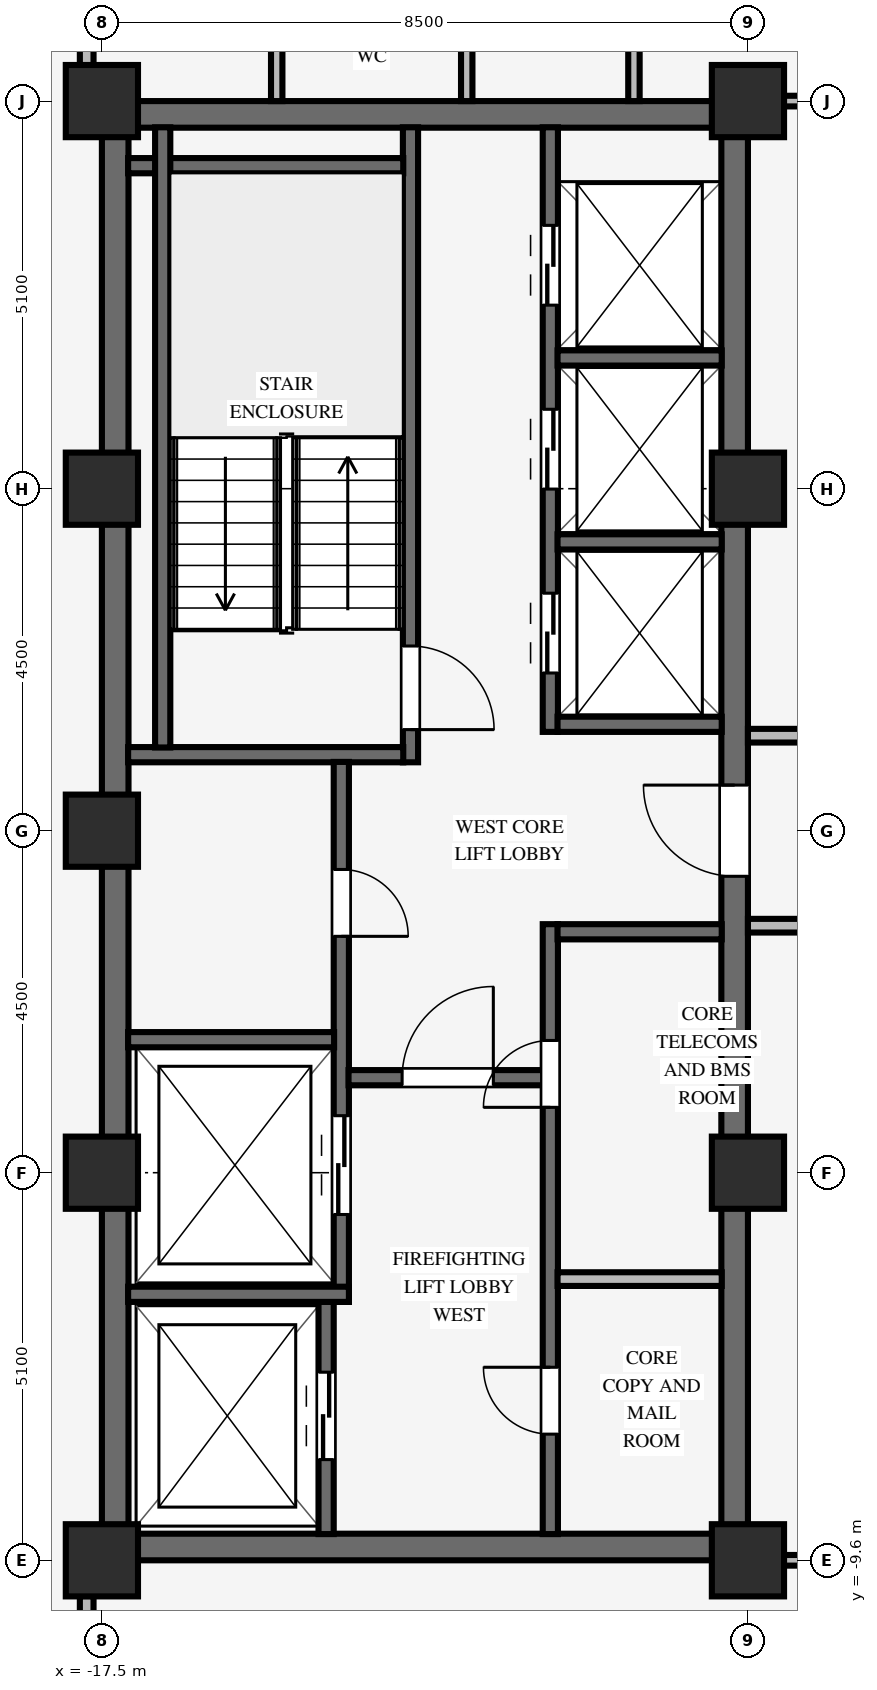
"""IFC4 building model, lengths in metres.
Left out: names, types, materials, properties, quantities, classifications, styles, units other than length and angle.
Written with IfcOpenShell. Run it as: python <this file> out.ifc"""

import sys

from ifc_helpers import new_model, si_unit, direction, frame, frame_2d, origin, origin_2d, place, context, subcontext, project, spatial, rectangle, extrude, source, transform, mapped, element, fill, save


model = new_model("IFC4")
c1 = context("Model", 3, precision=1e-05, world=origin(), true_north=direction((0.0, 1.0)))
c2 = subcontext(c1, "Body", "Model", "MODEL_VIEW")
j1 = project(units=[si_unit("LENGTHUNIT", "METRE"), si_unit("PLANEANGLEUNIT", "RADIAN")], contexts=[c1])
p1 = place(None, origin())
s1 = spatial("IfcSite", under=j1, at=p1, CompositionType="ELEMENT")
p2 = place(p1, origin())
s2 = spatial("IfcBuilding", under=s1, at=p2, CompositionType="ELEMENT")
p3 = place(p2, frame((0.0, 0.0, 223.75)))
s3 = spatial("IfcBuildingStorey", under=s2, at=p3, CompositionType="ELEMENT", Elevation=223.75)
for number, where, z_axis, x_axis in (
    (1, (-17.5, -9.425, 0.0), (0.0, 0.0, 1.0), (1.0, 0.0, 0.0)),
    (2, (-17.5, 9.425, 0.0), (0.0, 0.0, 1.0), (1.0, 0.0, 0.0)),
):
    element("IfcWall", number, at=place(p3, frame(where, z_axis=z_axis, x_axis=x_axis)), inside=s3, PredefinedType="SHEAR", context=c2, shape_type="SweptSolid", body=[
        extrude(rectangle(XDim=8.5, YDim=0.35, at=frame_2d((4.25, 0.0))), origin(), (0.0, 0.0, 1.0), 3.37),
    ])
p4 = place(p3, frame((-17.325, -9.255, 0.0), z_axis=(0.0, 0.0, 1.0), x_axis=(0.0, 1.0, 0.0)))
e3 = element("IfcWall", 3, at=p4, inside=s3, PredefinedType="SHEAR", context=c2, shape_type="SweptSolid", body=[
    extrude(rectangle(XDim=18.51, YDim=0.35, at=frame_2d((9.255, 0.0))), origin(), (0.0, 0.0, 1.0), 3.37),
])
p5 = place(p3, frame((-9.175, -9.255, 0.0), z_axis=(0.0, 0.0, 1.0), x_axis=(0.0, 1.0, 0.0)))
e4 = element("IfcWall", 4, at=p5, inside=s3, PredefinedType="SHEAR", context=c2, shape_type="SweptSolid", body=[
    extrude(rectangle(XDim=18.51, YDim=0.35, at=frame_2d((9.255, 0.0))), origin(), (0.0, 0.0, 1.0), 3.37),
])
p6 = place(p5, frame((8.655, 0.0, 0.0)))
e5 = element("IfcOpeningElement", 5, at=p6, cuts=e4, PredefinedType="OPENING", context=c2, shape_type="SweptSolid", body=[
    extrude(rectangle(XDim=1.2, YDim=2.15, at=frame_2d((0.6, 1.075))), frame((0.0, 0.185, 0.0), z_axis=(0.0, -1.0, 0.0), x_axis=(1.0, 0.0, 0.0)), (0.0, 0.0, 1.0), 0.37),
])
for number, where, z_axis, x_axis in (
    (6, (-17.5, -9.6, 0.0), (0.0, 0.0, 1.0), (1.0, 0.0, 0.0)),
    (7, (-17.5, -4.5, 0.0), (0.0, 0.0, 1.0), (1.0, 0.0, 0.0)),
    (8, (-17.5, 4.5, 0.0), (0.0, 0.0, 1.0), (1.0, 0.0, 0.0)),
    (9, (-17.5, 9.6, 0.0), (0.0, 0.0, 1.0), (1.0, 0.0, 0.0)),
    (10, (-9.0, -9.6, 0.0), (0.0, 0.0, 1.0), (1.0, 0.0, 0.0)),
    (11, (-9.0, -4.5, 0.0), (0.0, 0.0, 1.0), (1.0, 0.0, 0.0)),
    (12, (-9.0, 4.5, 0.0), (0.0, 0.0, 1.0), (1.0, 0.0, 0.0)),
    (13, (-9.0, 9.6, 0.0), (0.0, 0.0, 1.0), (1.0, 0.0, 0.0)),
    (14, (-17.5, 0.0, 0.0), (0.0, 0.0, 1.0), (1.0, 0.0, 0.0)),
):
    element("IfcColumn", number, at=place(p3, frame(where, z_axis=z_axis, x_axis=x_axis)), inside=s3, PredefinedType="COLUMN", context=c2, shape_type="SweptSolid", body=[
        extrude(rectangle(XDim=0.95, YDim=0.95, at=origin_2d()), origin(), (0.0, 0.0, 1.0), 3.37),
    ])
p7 = place(p3, frame((-13.44, 0.9, 0.0), z_axis=(0.0, 0.0, 1.0), x_axis=(0.0, 1.0, 0.0)))
e15 = element("IfcWall", 15, at=p7, inside=s3, PredefinedType="SHEAR", context=c2, shape_type="SweptSolid", body=[
    extrude(rectangle(XDim=8.355, YDim=0.2, at=frame_2d((4.177, 0.0))), origin(), (0.0, 0.0, 1.0), 3.37),
])
p8 = place(p7, frame((1.53, 0.0, 0.0), z_axis=(0.0, 0.0, 1.0), x_axis=(-1.0, 0.0, 0.0)))
e16 = element("IfcOpeningElement", 16, at=p8, cuts=e15, PredefinedType="OPENING", context=c2, shape_type="SweptSolid", body=[
    extrude(rectangle(XDim=1.1, YDim=2.15, at=frame_2d((0.55, 1.075))), frame((0.0, 0.11, 0.0), z_axis=(0.0, -1.0, 0.0), x_axis=(1.0, 0.0, 0.0)), (0.0, 0.0, 1.0), 0.22),
])
for number, where, z_axis, x_axis in (
    (17, (-17.155, 1.0, 0.0), (0.0, 0.0, 1.0), (1.0, 0.0, 0.0)),
    (18, (-17.155, 8.75, 0.0), (0.0, 0.0, 1.0), (1.0, 0.0, 0.0)),
):
    element("IfcWall", number, at=place(p3, frame(where, z_axis=z_axis, x_axis=x_axis)), inside=s3, PredefinedType="SHEAR", context=c2, shape_type="SweptSolid", body=[
        extrude(rectangle(XDim=3.62, YDim=0.2, at=frame_2d((1.81, 0.0))), origin(), (0.0, 0.0, 1.0), 3.37),
    ])
p9 = place(p3, frame((-16.7, 1.095, 0.0), z_axis=(0.0, 0.0, 1.0), x_axis=(0.0, 1.0, 0.0)))
e19 = element("IfcWall", 19, at=p9, inside=s3, PredefinedType="SHEAR", context=c2, shape_type="SweptSolid", body=[
    extrude(rectangle(XDim=8.16, YDim=0.2, at=frame_2d((4.08, 0.0))), origin(), (0.0, 0.0, 1.0), 3.37),
])
p10 = place(p3, frame((-14.55, -9.255, 0.0), z_axis=(0.0, 0.0, 1.0), x_axis=(0.0, 1.0, 0.0)))
e20 = element("IfcWall", 20, at=p10, inside=s3, PredefinedType="SHEAR", context=c2, shape_type="SweptSolid", body=[
    extrude(rectangle(XDim=3.06, YDim=0.2, at=frame_2d((1.53, 0.0))), origin(), (0.0, 0.0, 1.0), 3.37),
])
p11 = place(p10, frame((0.98, 0.0, 0.0)))
e21 = element("IfcOpeningElement", 21, at=p11, cuts=e20, PredefinedType="OPENING", context=c2, shape_type="SweptSolid", body=[
    extrude(rectangle(XDim=1.15, YDim=2.15, at=frame_2d((0.575, 1.075))), frame((0.0, 0.11, 0.0), z_axis=(0.0, -1.0, 0.0), x_axis=(1.0, 0.0, 0.0)), (0.0, 0.0, 1.0), 0.22),
])
p12 = place(p3, frame((-14.35, -6.2, 0.0), z_axis=(0.0, 0.0, 1.0), x_axis=(0.0, 1.0, 0.0)))
e22 = element("IfcWall", 22, at=p12, inside=s3, PredefinedType="SHEAR", context=c2, shape_type="SweptSolid", body=[
    extrude(rectangle(XDim=7.105, YDim=0.2, at=frame_2d((3.552, 0.0))), origin(), (0.0, 0.0, 1.0), 3.37),
])
p13 = place(p12, frame((5.69, 0.0, 0.0), z_axis=(0.0, 0.0, 1.0), x_axis=(-1.0, 0.0, 0.0)))
e23 = element("IfcOpeningElement", 23, at=p13, cuts=e22, PredefinedType="OPENING", context=c2, shape_type="SweptSolid", body=[
    extrude(rectangle(XDim=0.88, YDim=2.1, at=frame_2d((0.44, 1.05))), frame((0.0, 0.11, 0.0), z_axis=(0.0, -1.0, 0.0), x_axis=(1.0, 0.0, 0.0)), (0.0, 0.0, 1.0), 0.22),
])
p14 = place(p12, frame((1.15, 0.0, 0.0)))
e24 = element("IfcOpeningElement", 24, at=p14, cuts=e22, PredefinedType="OPENING", context=c2, shape_type="SweptSolid", body=[
    extrude(rectangle(XDim=1.3, YDim=2.2, at=frame_2d((0.65, 1.1))), frame((0.0, 0.11, 0.0), z_axis=(0.0, -1.0, 0.0), x_axis=(1.0, 0.0, 0.0)), (0.0, 0.0, 1.0), 0.22),
])
p15 = place(p3, frame((-17.155, -6.1, 0.0), z_axis=(0.0, 0.0, 1.0), x_axis=(1.0, 0.0, 0.0)))
e25 = element("IfcWall", 25, at=p15, inside=s3, PredefinedType="SHEAR", context=c2, shape_type="SweptSolid", body=[
    extrude(rectangle(XDim=2.905, YDim=0.2, at=frame_2d((1.453, 0.0))), origin(), (0.0, 0.0, 1.0), 3.37),
])
p16 = place(p3, frame((-17.155, -2.75, 0.0), z_axis=(0.0, 0.0, 1.0), x_axis=(1.0, 0.0, 0.0)))
e26 = element("IfcWall", 26, at=p16, inside=s3, PredefinedType="SHEAR", context=c2, shape_type="SweptSolid", body=[
    extrude(rectangle(XDim=2.71, YDim=0.2, at=frame_2d((1.355, 0.0))), origin(), (0.0, 0.0, 1.0), 3.37),
])
p17 = place(p3, frame((-11.6, -9.255, 0.0), z_axis=(0.0, 0.0, 1.0), x_axis=(0.0, 1.0, 0.0)))
e27 = element("IfcWall", 27, at=p17, inside=s3, PredefinedType="SHEAR", context=c2, shape_type="SweptSolid", body=[
    extrude(rectangle(XDim=8.025, YDim=0.2, at=frame_2d((4.012, 0.0))), origin(), (0.0, 0.0, 1.0), 3.37),
])
p18 = place(p17, frame((1.315, 0.0, 0.0)))
e28 = element("IfcOpeningElement", 28, at=p18, cuts=e27, PredefinedType="OPENING", context=c2, shape_type="SweptSolid", body=[
    extrude(rectangle(XDim=0.88, YDim=2.1, at=frame_2d((0.44, 1.05))), frame((0.0, 0.11, 0.0), z_axis=(0.0, -1.0, 0.0), x_axis=(1.0, 0.0, 0.0)), (0.0, 0.0, 1.0), 0.22),
])
p19 = place(p17, frame((5.615, 0.0, 0.0)))
e29 = element("IfcOpeningElement", 29, at=p19, cuts=e27, PredefinedType="OPENING", context=c2, shape_type="SweptSolid", body=[
    extrude(rectangle(XDim=0.88, YDim=2.1, at=frame_2d((0.44, 1.05))), frame((0.0, 0.11, 0.0), z_axis=(0.0, -1.0, 0.0), x_axis=(1.0, 0.0, 0.0)), (0.0, 0.0, 1.0), 0.22),
])
p20 = place(p3, frame((-14.255, -3.25, 0.0), z_axis=(0.0, 0.0, 1.0), x_axis=(1.0, 0.0, 0.0)))
e30 = element("IfcWall", 30, at=p20, inside=s3, PredefinedType="SHEAR", context=c2, shape_type="SweptSolid", body=[
    extrude(rectangle(XDim=2.56, YDim=0.2, at=frame_2d((1.28, 0.0))), origin(), (0.0, 0.0, 1.0), 3.37),
])
p21 = place(p20, frame((0.705, 0.0, 0.0)))
e31 = element("IfcOpeningElement", 31, at=p21, cuts=e30, PredefinedType="OPENING", context=c2, shape_type="SweptSolid", body=[
    extrude(rectangle(XDim=1.2, YDim=2.15, at=frame_2d((0.6, 1.075))), frame((0.0, 0.11, 0.0), z_axis=(0.0, -1.0, 0.0), x_axis=(1.0, 0.0, 0.0)), (0.0, 0.0, 1.0), 0.22),
])
p22 = place(p3, frame((-11.505, -1.33, 0.0), z_axis=(0.0, 0.0, 1.0), x_axis=(1.0, 0.0, 0.0)))
e32 = element("IfcWall", 32, at=p22, inside=s3, PredefinedType="SHEAR", context=c2, shape_type="SweptSolid", body=[
    extrude(rectangle(XDim=2.16, YDim=0.2, at=frame_2d((1.08, 0.0))), origin(), (0.0, 0.0, 1.0), 3.37),
])
p23 = place(p3, frame((-11.505, -5.9, 0.0), z_axis=(0.0, 0.0, 1.0), x_axis=(1.0, 0.0, 0.0)))
e33 = element("IfcWall", 33, at=p23, inside=s3, PredefinedType="PARTITIONING", context=c2, shape_type="SweptSolid", body=[
    extrude(rectangle(XDim=2.16, YDim=0.18, at=frame_2d((1.08, 0.0))), origin(), (0.0, 0.0, 1.0), 3.36),
])
p24 = place(p3, frame((-11.6, 1.3, 0.0), z_axis=(0.0, 0.0, 1.0), x_axis=(0.0, 1.0, 0.0)))
e34 = element("IfcWall", 34, at=p24, inside=s3, PredefinedType="SHEAR", context=c2, shape_type="SweptSolid", body=[
    extrude(rectangle(XDim=7.955, YDim=0.2, at=frame_2d((3.978, 0.0))), origin(), (0.0, 0.0, 1.0), 3.37),
])
p25 = place(p24, frame((0.775, 0.0, 0.0)))
e35 = element("IfcOpeningElement", 35, at=p25, cuts=e34, PredefinedType="OPENING", context=c2, shape_type="SweptSolid", body=[
    extrude(rectangle(XDim=1.05, YDim=2.15, at=frame_2d((0.525, 1.075))), frame((0.0, 0.11, 0.0), z_axis=(0.0, -1.0, 0.0), x_axis=(1.0, 0.0, 0.0)), (0.0, 0.0, 1.0), 0.22),
])
p26 = place(p24, frame((3.195, 0.0, 0.0)))
e36 = element("IfcOpeningElement", 36, at=p26, cuts=e34, PredefinedType="OPENING", context=c2, shape_type="SweptSolid", body=[
    extrude(rectangle(XDim=1.05, YDim=2.15, at=frame_2d((0.525, 1.075))), frame((0.0, 0.11, 0.0), z_axis=(0.0, -1.0, 0.0), x_axis=(1.0, 0.0, 0.0)), (0.0, 0.0, 1.0), 0.22),
])
p27 = place(p24, frame((5.615, 0.0, 0.0)))
e37 = element("IfcOpeningElement", 37, at=p27, cuts=e34, PredefinedType="OPENING", context=c2, shape_type="SweptSolid", body=[
    extrude(rectangle(XDim=1.05, YDim=2.15, at=frame_2d((0.525, 1.075))), frame((0.0, 0.11, 0.0), z_axis=(0.0, -1.0, 0.0), x_axis=(1.0, 0.0, 0.0)), (0.0, 0.0, 1.0), 0.22),
])
for number, where, z_axis, x_axis in (
    (38, (-11.505, 1.4, 0.0), (0.0, 0.0, 1.0), (1.0, 0.0, 0.0)),
    (39, (-11.505, 3.8, 0.0), (0.0, 0.0, 1.0), (1.0, 0.0, 0.0)),
    (40, (-11.505, 6.22, 0.0), (0.0, 0.0, 1.0), (1.0, 0.0, 0.0)),
):
    element("IfcWall", number, at=place(p3, frame(where, z_axis=z_axis, x_axis=x_axis)), inside=s3, PredefinedType="SHEAR", context=c2, shape_type="SweptSolid", body=[
        extrude(rectangle(XDim=2.16, YDim=0.2, at=frame_2d((1.08, 0.0))), origin(), (0.0, 0.0, 1.0), 3.37),
    ])
p28 = place(p3, frame((-8.529, -9.6, 0.0), z_axis=(0.0, 0.0, 1.0), x_axis=(1.0, 0.0, 0.0)))
e41 = element("IfcWall", 41, at=p28, inside=s3, PredefinedType="PARTITIONING", context=c2, shape_type="SweptSolid", body=[
    extrude(rectangle(XDim=8.378, YDim=0.14, at=frame_2d((4.189, 0.0))), origin(), (0.0, 0.0, 1.0), 2.405),
])
p29 = place(p3, frame((-9.0, -1.25, 0.0), z_axis=(0.0, 0.0, 1.0), x_axis=(1.0, 0.0, 0.0)))
e42 = element("IfcWall", 42, at=p29, inside=s3, PredefinedType="PARTITIONING", context=c2, shape_type="SweptSolid", body=[
    extrude(rectangle(XDim=15.6, YDim=0.18, at=frame_2d((7.8, 0.0))), origin(), (0.0, 0.0, 1.0), 3.36),
])
p30 = place(p29, frame((7.32, 0.0, 0.0)))
e43 = element("IfcOpeningElement", 43, at=p30, cuts=e42, PredefinedType="OPENING", context=c2, shape_type="SweptSolid", body=[
    extrude(rectangle(XDim=0.96, YDim=2.1, at=frame_2d((0.48, 1.05))), frame((0.0, 0.1, 0.0), z_axis=(0.0, -1.0, 0.0), x_axis=(1.0, 0.0, 0.0)), (0.0, 0.0, 1.0), 0.2),
])
p31 = place(p3, frame((-9.0, 1.25, 0.0), z_axis=(0.0, 0.0, 1.0), x_axis=(1.0, 0.0, 0.0)))
e44 = element("IfcWall", 44, at=p31, inside=s3, PredefinedType="PARTITIONING", context=c2, shape_type="SweptSolid", body=[
    extrude(rectangle(XDim=15.6, YDim=0.18, at=frame_2d((7.8, 0.0))), origin(), (0.0, 0.0, 1.0), 3.36),
])
p32 = place(p31, frame((7.32, 0.0, 0.0)))
e45 = element("IfcOpeningElement", 45, at=p32, cuts=e44, PredefinedType="OPENING", context=c2, shape_type="SweptSolid", body=[
    extrude(rectangle(XDim=0.96, YDim=2.1, at=frame_2d((0.48, 1.05))), frame((0.0, 0.1, 0.0), z_axis=(0.0, -1.0, 0.0), x_axis=(1.0, 0.0, 0.0)), (0.0, 0.0, 1.0), 0.2),
])
p33 = place(p3, frame((-8.529, 9.6, 0.0), z_axis=(0.0, 0.0, 1.0), x_axis=(1.0, 0.0, 0.0)))
e46 = element("IfcWall", 46, at=p33, inside=s3, PredefinedType="PARTITIONING", context=c2, shape_type="SweptSolid", body=[
    extrude(rectangle(XDim=8.378, YDim=0.14, at=frame_2d((4.189, 0.0))), origin(), (0.0, 0.0, 1.0), 2.405),
])
p34 = place(p3, frame((-17.7, -13.414, 0.0), z_axis=(0.0, 0.0, 1.0), x_axis=(0.0, 1.0, 0.0)))
e47 = element("IfcWall", 47, at=p34, inside=s3, PredefinedType="PARTITIONING", context=c2, shape_type="SweptSolid", body=[
    extrude(rectangle(XDim=3.343, YDim=0.18, at=frame_2d((1.671, 0.0))), origin(), (0.0, 0.0, 1.0), 2.892),
])
p35 = place(p3, frame((-17.7, 10.071, 0.0), z_axis=(0.0, 0.0, 1.0), x_axis=(0.0, 1.0, 0.0)))
e48 = element("IfcWall", 48, at=p35, inside=s3, PredefinedType="PARTITIONING", context=c2, shape_type="SweptSolid", body=[
    extrude(rectangle(XDim=3.343, YDim=0.18, at=frame_2d((1.671, 0.0))), origin(), (0.0, 0.0, 1.0), 2.892),
])
p36 = place(p35, frame((1.221, 0.0, 0.0)))
e49 = element("IfcOpeningElement", 49, at=p36, cuts=e48, PredefinedType="OPENING", context=c2, shape_type="SweptSolid", body=[
    extrude(rectangle(XDim=0.9, YDim=2.1, at=frame_2d((0.45, 1.05))), frame((0.0, 0.1, 0.0), z_axis=(0.0, -1.0, 0.0), x_axis=(1.0, 0.0, 0.0)), (0.0, 0.0, 1.0), 0.2),
])
for number, where, z_axis, x_axis in (
    (50, (-15.2, 9.6, 0.0), (0.0, 0.0, 1.0), (0.0, 1.0, 0.0)),
    (51, (-12.7, 9.6, 0.0), (0.0, 0.0, 1.0), (0.0, 1.0, 0.0)),
    (52, (-10.5, 9.6, 0.0), (0.0, 0.0, 1.0), (0.0, 1.0, 0.0)),
):
    element("IfcWall", number, at=place(p3, frame(where, z_axis=z_axis, x_axis=x_axis)), inside=s3, PredefinedType="PARTITIONING", context=c2, shape_type="SweptSolid", body=[
        extrude(rectangle(XDim=3.814, YDim=0.15, at=frame_2d((1.907, 0.0))), origin(), (0.0, 0.0, 1.0), 3.36),
    ])
m1 = source(origin(), c2, "Body", "SweptSolid", [
    extrude(rectangle(XDim=1.1, YDim=2.15, at=frame_2d((0.55, 1.075))), frame((0.0, 0.025, 0.0), z_axis=(0.0, -1.0, 0.0), x_axis=(1.0, 0.0, 0.0)), (0.0, 0.0, 1.0), 0.05),
])
p37 = place(p8, origin())
e53 = element("IfcDoor", 53, at=p37, inside=s3, OperationType="SINGLE_SWING_RIGHT", PredefinedType="DOOR", context=c2, shape_type="MappedRepresentation", body=[
    mapped(m1, transform((0.0, 0.0, 0.0), scale=1.0)),
])
fill(e16, e53)
m2 = source(origin(), c2, "Body", "SweptSolid", [
    extrude(rectangle(XDim=0.88, YDim=2.1, at=frame_2d((0.44, 1.05))), frame((0.0, 0.025, 0.0), z_axis=(0.0, -1.0, 0.0), x_axis=(1.0, 0.0, 0.0)), (0.0, 0.0, 1.0), 0.05),
])
p38 = place(p13, origin())
e54 = element("IfcDoor", 54, at=p38, inside=s3, OperationType="SINGLE_SWING_RIGHT", PredefinedType="DOOR", context=c2, shape_type="MappedRepresentation", body=[
    mapped(m2, transform((0.0, 0.0, 0.0), scale=1.0)),
])
fill(e23, e54)
m3 = source(origin(), c2, "Body", "SweptSolid", [
    extrude(rectangle(XDim=1.2, YDim=2.15, at=frame_2d((0.6, 1.075))), frame((0.0, 0.025, 0.0), z_axis=(0.0, -1.0, 0.0), x_axis=(1.0, 0.0, 0.0)), (0.0, 0.0, 1.0), 0.05),
])
p39 = place(p21, origin())
e55 = element("IfcDoor", 55, at=p39, inside=s3, OperationType="SINGLE_SWING_RIGHT", PredefinedType="DOOR", context=c2, shape_type="MappedRepresentation", body=[
    mapped(m3, transform((0.0, 0.0, 0.0), scale=1.0)),
])
fill(e31, e55)
p40 = place(p18, origin())
e56 = element("IfcDoor", 56, at=p40, inside=s3, OperationType="SINGLE_SWING_RIGHT", PredefinedType="DOOR", context=c2, shape_type="MappedRepresentation", body=[
    mapped(m2, transform((0.0, 0.0, 0.0), scale=1.0)),
])
fill(e28, e56)
p41 = place(p19, origin())
e57 = element("IfcDoor", 57, at=p41, inside=s3, OperationType="SINGLE_SWING_LEFT", PredefinedType="DOOR", context=c2, shape_type="MappedRepresentation", body=[
    mapped(m2, transform((0.0, 0.0, 0.0), scale=1.0)),
])
fill(e29, e57)
p42 = place(p6, origin())
e58 = element("IfcDoor", 58, at=p42, inside=s3, OperationType="SINGLE_SWING_RIGHT", PredefinedType="DOOR", context=c2, shape_type="MappedRepresentation", body=[
    mapped(m3, transform((0.0, 0.0, 0.0), scale=1.0)),
])
fill(e5, e58)
m4 = source(origin(), c2, "Body", "SweptSolid", [
    extrude(rectangle(XDim=1.15, YDim=2.15, at=frame_2d((0.575, 1.075))), frame((0.0, 0.025, 0.0), z_axis=(0.0, -1.0, 0.0), x_axis=(1.0, 0.0, 0.0)), (0.0, 0.0, 1.0), 0.05),
])
p43 = place(p11, origin())
e59 = element("IfcDoor", 59, at=p43, inside=s3, OperationType="DOUBLE_DOOR_SLIDING", PredefinedType="DOOR", context=c2, shape_type="MappedRepresentation", body=[
    mapped(m4, transform((0.0, 0.0, 0.0), scale=1.0)),
])
fill(e21, e59)
m5 = source(origin(), c2, "Body", "SweptSolid", [
    extrude(rectangle(XDim=1.3, YDim=2.2, at=frame_2d((0.65, 1.1))), frame((0.0, 0.025, 0.0), z_axis=(0.0, -1.0, 0.0), x_axis=(1.0, 0.0, 0.0)), (0.0, 0.0, 1.0), 0.05),
])
p44 = place(p14, origin())
e60 = element("IfcDoor", 60, at=p44, inside=s3, OperationType="DOUBLE_DOOR_SLIDING", PredefinedType="DOOR", context=c2, shape_type="MappedRepresentation", body=[
    mapped(m5, transform((0.0, 0.0, 0.0), scale=1.0)),
])
fill(e24, e60)
m6 = source(origin(), c2, "Body", "SweptSolid", [
    extrude(rectangle(XDim=1.05, YDim=2.15, at=frame_2d((0.525, 1.075))), frame((0.0, 0.025, 0.0), z_axis=(0.0, -1.0, 0.0), x_axis=(1.0, 0.0, 0.0)), (0.0, 0.0, 1.0), 0.05),
])
p45 = place(p25, origin())
e61 = element("IfcDoor", 61, at=p45, inside=s3, OperationType="DOUBLE_DOOR_SLIDING", PredefinedType="DOOR", context=c2, shape_type="MappedRepresentation", body=[
    mapped(m6, transform((0.0, 0.0, 0.0), scale=1.0)),
])
fill(e35, e61)
p46 = place(p26, origin())
e62 = element("IfcDoor", 62, at=p46, inside=s3, OperationType="DOUBLE_DOOR_SLIDING", PredefinedType="DOOR", context=c2, shape_type="MappedRepresentation", body=[
    mapped(m6, transform((0.0, 0.0, 0.0), scale=1.0)),
])
fill(e36, e62)
p47 = place(p27, origin())
e63 = element("IfcDoor", 63, at=p47, inside=s3, OperationType="DOUBLE_DOOR_SLIDING", PredefinedType="DOOR", context=c2, shape_type="MappedRepresentation", body=[
    mapped(m6, transform((0.0, 0.0, 0.0), scale=1.0)),
])
fill(e37, e63)
save(model, sys.argv[1])
